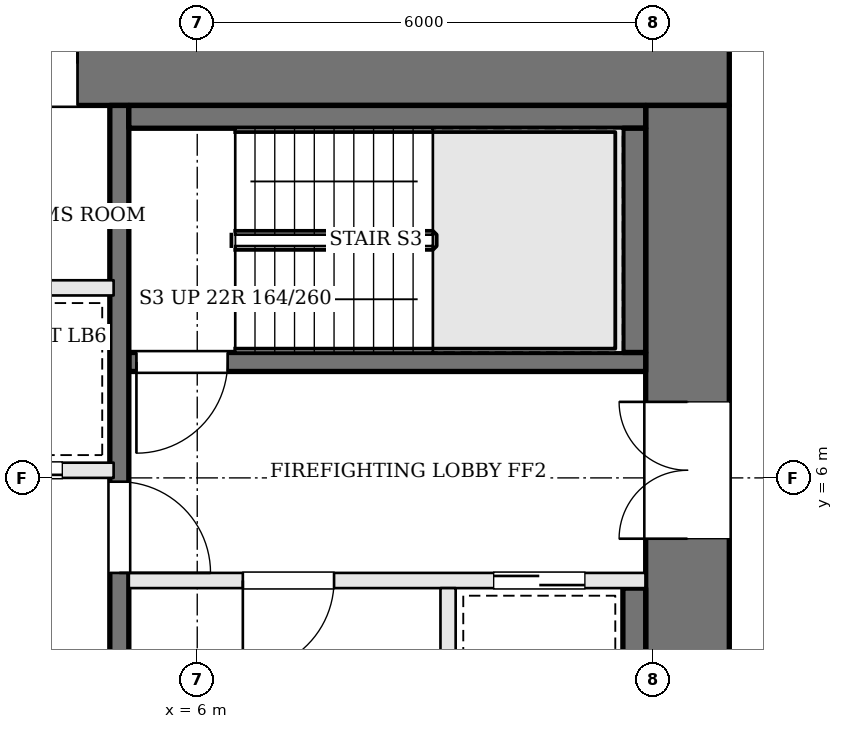
"""IFC4 building model, lengths in metres.
Left out: names, types, materials, properties, quantities, classifications, styles, units other than length and angle.
Written with IfcOpenShell. Run it as: python <this file> out.ifc"""

import sys

from ifc_helpers import new_model, si_unit, direction, frame, frame_2d, origin, place, context, subcontext, project, spatial, rectangle, extrude, element, fill, save


model = new_model("IFC4")
c1 = context("Model", 3, precision=1e-05, world=origin(), true_north=direction((0.0, 1.0)))
c2 = subcontext(c1, "Body", "Model", "MODEL_VIEW")
j1 = project(units=[si_unit("LENGTHUNIT", "METRE"), si_unit("PLANEANGLEUNIT", "RADIAN")], contexts=[c1])
p1 = place(None, origin())
s1 = spatial("IfcSite", under=j1, at=p1, CompositionType="ELEMENT")
p2 = place(p1, origin())
s2 = spatial("IfcBuilding", under=s1, at=p2, CompositionType="ELEMENT")
p3 = place(p2, frame((0.0, 0.0, 81.6)))
s3 = spatial("IfcBuildingStorey", under=s2, at=p3, CompositionType="ELEMENT", Elevation=81.6)
p4 = place(p3, frame((-13.0, 11.45, 0.0), z_axis=(0.0, 0.0, 1.0), x_axis=(1.0, 0.0, 0.0)))
e1 = element("IfcWall", 1, at=p4, inside=s3, PredefinedType="SHEAR", context=c2, shape_type="SweptSolid", body=[
    extrude(rectangle(XDim=26.0, YDim=1.1, at=frame_2d((13.0, 0.0))), origin(), (0.0, 0.0, 1.0), 3.6),
])
p5 = place(p4, frame((8.825, 0.0, 0.0)))
e2 = element("IfcOpeningElement", 2, at=p5, cuts=e1, PredefinedType="OPENING", context=c2, shape_type="SweptSolid", body=[
    extrude(rectangle(XDim=1.0, YDim=2.1, at=frame_2d((0.5, 1.05))), frame((0.0, 0.56, 0.0), z_axis=(0.0, -1.0, 0.0), x_axis=(1.0, 0.0, 0.0)), (0.0, 0.0, 1.0), 1.12),
])
p6 = place(p4, frame((11.275, 0.0, 0.0)))
e3 = element("IfcOpeningElement", 3, at=p6, cuts=e1, PredefinedType="OPENING", context=c2, shape_type="SweptSolid", body=[
    extrude(rectangle(XDim=1.0, YDim=2.1, at=frame_2d((0.5, 1.05))), frame((0.0, 0.56, 0.0), z_axis=(0.0, -1.0, 0.0), x_axis=(1.0, 0.0, 0.0)), (0.0, 0.0, 1.0), 1.12),
])
p7 = place(p4, frame((14.125, 0.0, 0.0)))
e4 = element("IfcOpeningElement", 4, at=p7, cuts=e1, PredefinedType="OPENING", context=c2, shape_type="SweptSolid", body=[
    extrude(rectangle(XDim=1.0, YDim=2.1, at=frame_2d((0.5, 1.05))), frame((0.0, 0.56, 0.0), z_axis=(0.0, -1.0, 0.0), x_axis=(1.0, 0.0, 0.0)), (0.0, 0.0, 1.0), 1.12),
])
p8 = place(p4, frame((16.725, 0.0, 0.0)))
e5 = element("IfcOpeningElement", 5, at=p8, cuts=e1, PredefinedType="OPENING", context=c2, shape_type="SweptSolid", body=[
    extrude(rectangle(XDim=0.7, YDim=2.1, at=frame_2d((0.35, 1.05))), frame((0.0, 0.56, 0.0), z_axis=(0.0, -1.0, 0.0), x_axis=(1.0, 0.0, 0.0)), (0.0, 0.0, 1.0), 1.12),
])
p9 = place(p3, frame((12.45, -1.9, 0.0), z_axis=(0.0, 0.0, 1.0), x_axis=(0.0, 1.0, 0.0)))
e6 = element("IfcWall", 6, at=p9, inside=s3, PredefinedType="SHEAR", context=c2, shape_type="SweptSolid", body=[
    extrude(rectangle(XDim=12.8, YDim=1.1, at=frame_2d((6.4, 0.0))), origin(), (0.0, 0.0, 1.0), 3.6),
])
p10 = place(p9, frame((7.1, 0.0, 0.0)))
e7 = element("IfcOpeningElement", 7, at=p10, cuts=e6, PredefinedType="OPENING", context=c2, shape_type="SweptSolid", body=[
    extrude(rectangle(XDim=1.8, YDim=2.1, at=frame_2d((0.9, 1.05))), frame((0.0, 0.56, 0.0), z_axis=(0.0, -1.0, 0.0), x_axis=(1.0, 0.0, 0.0)), (0.0, 0.0, 1.0), 1.12),
])
p11 = place(p3, frame((11.9, 7.525, 0.0), z_axis=(0.0, 0.0, 1.0), x_axis=(-1.0, 0.0, 0.0)))
e8 = element("IfcWall", 8, at=p11, inside=s3, PredefinedType="SOLIDWALL", context=c2, shape_type="SweptSolid", body=[
    extrude(rectangle(XDim=6.8, YDim=0.25, at=frame_2d((3.4, 0.0))), origin(), (0.0, 0.0, 1.0), 3.4),
])
p12 = place(p11, frame((5.5, 0.0, 0.0)))
e9 = element("IfcOpeningElement", 9, at=p12, cuts=e8, PredefinedType="OPENING", context=c2, shape_type="SweptSolid", body=[
    extrude(rectangle(XDim=1.2, YDim=2.1, at=frame_2d((0.6, 1.05))), frame((0.0, 0.135, 0.0), z_axis=(0.0, -1.0, 0.0), x_axis=(1.0, 0.0, 0.0)), (0.0, 0.0, 1.0), 0.27),
])
p13 = place(p3, frame((11.9, 4.65, 0.0), z_axis=(0.0, 0.0, 1.0), x_axis=(-1.0, 0.0, 0.0)))
e10 = element("IfcWall", 10, at=p13, inside=s3, PredefinedType="SOLIDWALL", context=c2, shape_type="SweptSolid", body=[
    extrude(rectangle(XDim=6.8, YDim=0.2, at=frame_2d((3.4, 0.0))), origin(), (0.0, 0.0, 1.0), 3.4),
])
p14 = place(p13, frame((4.1, 0.0, 0.0)))
e11 = element("IfcOpeningElement", 11, at=p14, cuts=e10, PredefinedType="OPENING", context=c2, shape_type="SweptSolid", body=[
    extrude(rectangle(XDim=1.2, YDim=2.1, at=frame_2d((0.6, 1.05))), frame((0.0, 0.11, 0.0), z_axis=(0.0, -1.0, 0.0), x_axis=(1.0, 0.0, 0.0)), (0.0, 0.0, 1.0), 0.22),
])
p15 = place(p13, frame((0.8, 0.0, 0.0)))
e12 = element("IfcOpeningElement", 12, at=p15, cuts=e10, PredefinedType="OPENING", context=c2, shape_type="SweptSolid", body=[
    extrude(rectangle(XDim=1.2, YDim=2.1, at=frame_2d((0.6, 1.05))), frame((0.0, 0.11, 0.0), z_axis=(0.0, -1.0, 0.0), x_axis=(1.0, 0.0, 0.0)), (0.0, 0.0, 1.0), 0.22),
])
p16 = place(p3, frame((9.3, 4.55, 0.0), z_axis=(0.0, 0.0, 1.0), x_axis=(0.0, -1.0, 0.0)))
e13 = element("IfcWall", 13, at=p16, inside=s3, PredefinedType="SOLIDWALL", context=c2, shape_type="SweptSolid", body=[
    extrude(rectangle(XDim=3.0, YDim=0.2, at=frame_2d((1.5, 0.0))), origin(), (0.0, 0.0, 1.0), 3.4),
])
p17 = place(p3, frame((4.975, 10.9, 0.0), z_axis=(0.0, 0.0, 1.0), x_axis=(0.0, -1.0, 0.0)))
e14 = element("IfcWall", 14, at=p17, inside=s3, PredefinedType="SOLIDWALL", context=c2, shape_type="SweptSolid", body=[
    extrude(rectangle(XDim=12.8, YDim=0.25, at=frame_2d((6.4, 0.0))), origin(), (0.0, 0.0, 1.0), 3.4),
])
p18 = place(p17, frame((4.95, 0.0, 0.0)))
e15 = element("IfcOpeningElement", 15, at=p18, cuts=e14, PredefinedType="OPENING", context=c2, shape_type="SweptSolid", body=[
    extrude(rectangle(XDim=1.2, YDim=2.1, at=frame_2d((0.6, 1.05))), frame((0.0, 0.135, 0.0), z_axis=(0.0, -1.0, 0.0), x_axis=(1.0, 0.0, 0.0)), (0.0, 0.0, 1.0), 0.27),
])
p19 = place(p3, frame((11.9, 10.75, 0.0), z_axis=(0.0, 0.0, 1.0), x_axis=(-1.0, 0.0, 0.0)))
e16 = element("IfcWall", 16, at=p19, inside=s3, PredefinedType="SOLIDWALL", context=c2, shape_type="SweptSolid", body=[
    extrude(rectangle(XDim=6.8, YDim=0.3, at=frame_2d((3.4, 0.0))), origin(), (0.0, 0.0, 1.0), 3.4),
])
p20 = place(p3, frame((11.75, 10.6, 0.0), z_axis=(0.0, 0.0, 1.0), x_axis=(0.0, -1.0, 0.0)))
e17 = element("IfcWall", 17, at=p20, inside=s3, PredefinedType="SOLIDWALL", context=c2, shape_type="SweptSolid", body=[
    extrude(rectangle(XDim=2.95, YDim=0.3, at=frame_2d((1.475, 0.0))), origin(), (0.0, 0.0, 1.0), 3.4),
])
p21 = place(p3, frame((11.75, 4.55, 0.0), z_axis=(0.0, 0.0, 1.0), x_axis=(0.0, -1.0, 0.0)))
e18 = element("IfcWall", 18, at=p21, inside=s3, PredefinedType="SOLIDWALL", context=c2, shape_type="SweptSolid", body=[
    extrude(rectangle(XDim=3.0, YDim=0.3, at=frame_2d((1.5, 0.0))), origin(), (0.0, 0.0, 1.0), 3.4),
])
p22 = place(p3, frame((-4.9, 6.1, 0.0), z_axis=(0.0, 0.0, 1.0), x_axis=(1.0, 0.0, 0.0)))
e19 = element("IfcWall", 19, at=p22, inside=s3, PredefinedType="SOLIDWALL", context=c2, shape_type="SweptSolid", body=[
    extrude(rectangle(XDim=9.8, YDim=0.2, at=frame_2d((4.9, 0.0))), origin(), (0.0, 0.0, 1.0), 3.4),
])
p23 = place(p22, frame((0.675, 0.0, 0.0)))
e20 = element("IfcOpeningElement", 20, at=p23, cuts=e19, PredefinedType="OPENING", context=c2, shape_type="SweptSolid", body=[
    extrude(rectangle(XDim=1.1, YDim=2.1, at=frame_2d((0.55, 1.05))), frame((0.0, 0.11, 0.0), z_axis=(0.0, -1.0, 0.0), x_axis=(1.0, 0.0, 0.0)), (0.0, 0.0, 1.0), 0.22),
])
p24 = place(p22, frame((3.125, 0.0, 0.0)))
e21 = element("IfcOpeningElement", 21, at=p24, cuts=e19, PredefinedType="OPENING", context=c2, shape_type="SweptSolid", body=[
    extrude(rectangle(XDim=1.1, YDim=2.1, at=frame_2d((0.55, 1.05))), frame((0.0, 0.11, 0.0), z_axis=(0.0, -1.0, 0.0), x_axis=(1.0, 0.0, 0.0)), (0.0, 0.0, 1.0), 0.22),
])
p25 = place(p22, frame((5.575, 0.0, 0.0)))
e22 = element("IfcOpeningElement", 22, at=p25, cuts=e19, PredefinedType="OPENING", context=c2, shape_type="SweptSolid", body=[
    extrude(rectangle(XDim=1.1, YDim=2.1, at=frame_2d((0.55, 1.05))), frame((0.0, 0.11, 0.0), z_axis=(0.0, -1.0, 0.0), x_axis=(1.0, 0.0, 0.0)), (0.0, 0.0, 1.0), 0.22),
])
p26 = place(p22, frame((8.025, 0.0, 0.0)))
e23 = element("IfcOpeningElement", 23, at=p26, cuts=e19, PredefinedType="OPENING", context=c2, shape_type="SweptSolid", body=[
    extrude(rectangle(XDim=1.1, YDim=2.1, at=frame_2d((0.55, 1.05))), frame((0.0, 0.11, 0.0), z_axis=(0.0, -1.0, 0.0), x_axis=(1.0, 0.0, 0.0)), (0.0, 0.0, 1.0), 0.22),
])
p27 = place(p3, frame((-4.9, 8.5, 0.0), z_axis=(0.0, 0.0, 1.0), x_axis=(1.0, 0.0, 0.0)))
e24 = element("IfcWall", 24, at=p27, inside=s3, PredefinedType="SOLIDWALL", context=c2, shape_type="SweptSolid", body=[
    extrude(rectangle(XDim=9.8, YDim=0.2, at=frame_2d((4.9, 0.0))), origin(), (0.0, 0.0, 1.0), 3.4),
])
p28 = place(p10, origin())
e25 = element("IfcDoor", 25, at=p28, inside=s3, OperationType="DOUBLE_DOOR_SINGLE_SWING", PredefinedType="DOOR", context=c2, shape_type="SweptSolid", body=[
    extrude(rectangle(XDim=1.8, YDim=2.1, at=frame_2d((0.9, 1.05))), frame((0.0, 0.025, 0.0), z_axis=(0.0, -1.0, 0.0), x_axis=(1.0, 0.0, 0.0)), (0.0, 0.0, 1.0), 0.05),
])
fill(e7, e25)
p29 = place(p18, origin())
e26 = element("IfcDoor", 26, at=p29, inside=s3, OperationType="SINGLE_SWING_RIGHT", PredefinedType="DOOR", context=c2, shape_type="SweptSolid", body=[
    extrude(rectangle(XDim=1.2, YDim=2.1, at=frame_2d((0.6, 1.05))), frame((0.0, 0.025, 0.0), z_axis=(0.0, -1.0, 0.0), x_axis=(1.0, 0.0, 0.0)), (0.0, 0.0, 1.0), 0.05),
])
fill(e15, e26)
p30 = place(p14, origin())
e27 = element("IfcDoor", 27, at=p30, inside=s3, OperationType="SINGLE_SWING_RIGHT", PredefinedType="DOOR", context=c2, shape_type="SweptSolid", body=[
    extrude(rectangle(XDim=1.2, YDim=2.1, at=frame_2d((0.6, 1.05))), frame((0.0, 0.025, 0.0), z_axis=(0.0, -1.0, 0.0), x_axis=(1.0, 0.0, 0.0)), (0.0, 0.0, 1.0), 0.05),
])
fill(e11, e27)
p31 = place(p12, origin())
e28 = element("IfcDoor", 28, at=p31, inside=s3, OperationType="SINGLE_SWING_RIGHT", PredefinedType="DOOR", context=c2, shape_type="SweptSolid", body=[
    extrude(rectangle(XDim=1.2, YDim=2.1, at=frame_2d((0.6, 1.05))), frame((0.0, 0.025, 0.0), z_axis=(0.0, -1.0, 0.0), x_axis=(1.0, 0.0, 0.0)), (0.0, 0.0, 1.0), 0.05),
])
fill(e9, e28)
p32 = place(p15, origin())
e29 = element("IfcDoor", 29, at=p32, inside=s3, OperationType="SLIDING_TO_RIGHT", PredefinedType="DOOR", context=c2, shape_type="SweptSolid", body=[
    extrude(rectangle(XDim=1.2, YDim=2.1, at=frame_2d((0.6, 1.05))), frame((0.0, 0.025, 0.0), z_axis=(0.0, -1.0, 0.0), x_axis=(1.0, 0.0, 0.0)), (0.0, 0.0, 1.0), 0.05),
])
fill(e12, e29)
p33 = place(p26, origin())
e30 = element("IfcDoor", 30, at=p33, inside=s3, OperationType="SLIDING_TO_LEFT", PredefinedType="DOOR", context=c2, shape_type="SweptSolid", body=[
    extrude(rectangle(XDim=1.1, YDim=2.1, at=frame_2d((0.55, 1.05))), frame((0.0, 0.025, 0.0), z_axis=(0.0, -1.0, 0.0), x_axis=(1.0, 0.0, 0.0)), (0.0, 0.0, 1.0), 0.05),
])
fill(e23, e30)
p34 = place(p8, origin())
e31 = element("IfcDoor", 31, at=p34, inside=s3, OperationType="SINGLE_SWING_RIGHT", PredefinedType="DOOR", context=c2, shape_type="SweptSolid", body=[
    extrude(rectangle(XDim=0.7, YDim=2.1, at=frame_2d((0.35, 1.05))), frame((0.0, 0.025, 0.0), z_axis=(0.0, -1.0, 0.0), x_axis=(1.0, 0.0, 0.0)), (0.0, 0.0, 1.0), 0.05),
])
fill(e5, e31)
save(model, sys.argv[1])
